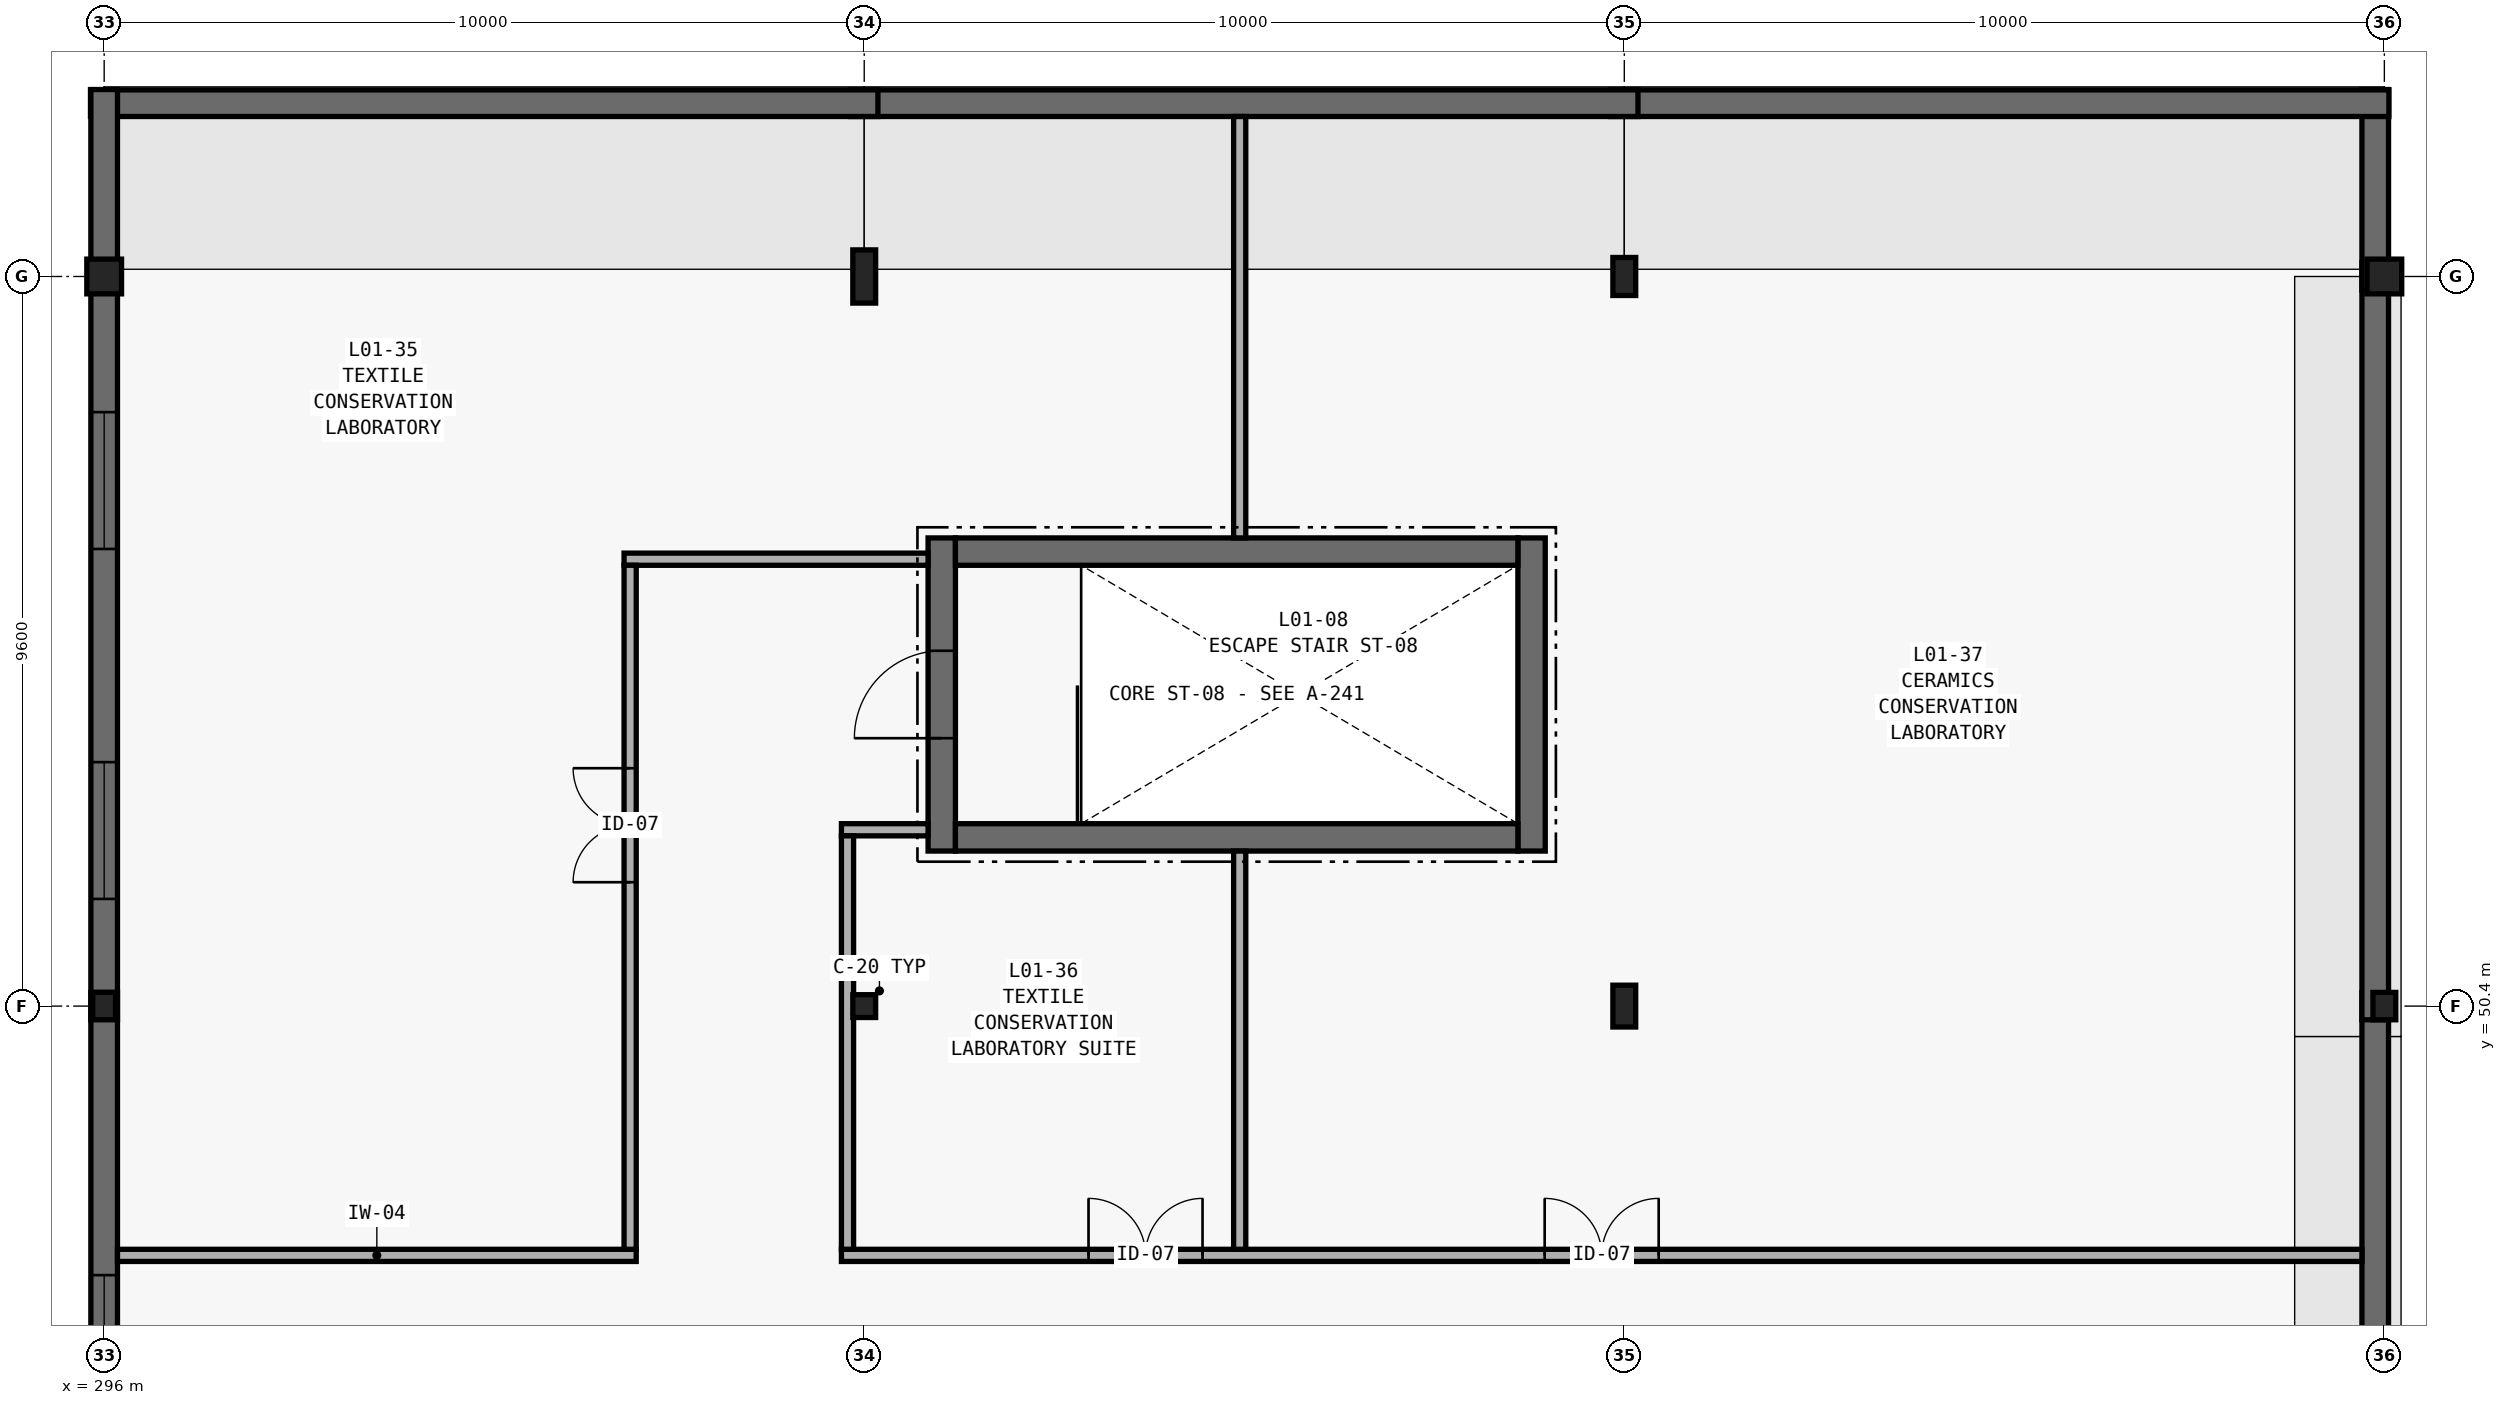
"""IFC4 building model, lengths in metres.
Left out: names, types, materials, properties, quantities, classifications, styles, units other than length and angle.
Written with IfcOpenShell. Run it as: python <this file> out.ifc"""

import sys

from ifc_helpers import new_model, si_unit, direction, frame, frame_2d, origin, origin_2d, place, context, subcontext, project, spatial, rectangle, hollow_rectangle, hollow_circle, i_section, extrude, element, fill, save


model = new_model("IFC4")
c1 = context("Model", 3, precision=1e-05, world=origin(), true_north=direction((0.0, 1.0)))
c2 = subcontext(c1, "Body", "Model", "MODEL_VIEW")
j1 = project(units=[si_unit("LENGTHUNIT", "METRE"), si_unit("PLANEANGLEUNIT", "RADIAN")], contexts=[c1])
p1 = place(None, origin())
s1 = spatial("IfcSite", under=j1, at=p1, CompositionType="ELEMENT")
p2 = place(p1, origin())
s2 = spatial("IfcBuilding", under=s1, at=p2, CompositionType="ELEMENT")
p3 = place(p2, frame((0.0, 0.0, 4.8)))
s3 = spatial("IfcBuildingStorey", under=s2, at=p3, CompositionType="ELEMENT", Elevation=4.8)
p4 = place(p3, frame((296.0, 50.4, 0.0), z_axis=(0.0, 0.0, 1.0), x_axis=(1.0, 0.0, 0.0)))
e1 = element("IfcColumn", 1, at=p4, inside=s3, PredefinedType="COLUMN", context=c2, shape_type="SweptSolid", body=[
    extrude(i_section(OverallWidth=0.3, OverallDepth=0.36, WebThickness=0.012, FlangeThickness=0.022, FilletRadius=0.027, at=origin_2d()), origin(), (0.0, 0.0, 1.0), 4.2),
])
p5 = place(p3, frame((296.0, 60.0, 0.0), z_axis=(0.0, 0.0, 1.0), x_axis=(1.0, 0.0, 0.0)))
e2 = element("IfcColumn", 2, at=p5, inside=s3, PredefinedType="COLUMN", context=c2, shape_type="SweptSolid", body=[
    extrude(hollow_circle(Radius=0.229, WallThickness=0.02, at=origin_2d()), origin(), (0.0, 0.0, 1.0), 4.2),
])
p6 = place(p3, frame((306.0, 50.4, 0.0), z_axis=(0.0, 0.0, 1.0), x_axis=(1.0, 0.0, 0.0)))
e3 = element("IfcColumn", 3, at=p6, inside=s3, PredefinedType="COLUMN", context=c2, shape_type="SweptSolid", body=[
    extrude(hollow_rectangle(XDim=0.3, YDim=0.3, WallThickness=0.016, at=origin_2d()), origin(), (0.0, 0.0, 1.0), 4.2),
])
p7 = place(p3, frame((306.0, 60.0, 0.0), z_axis=(0.0, 0.0, 1.0), x_axis=(1.0, 0.0, 0.0)))
e4 = element("IfcColumn", 4, at=p7, inside=s3, PredefinedType="COLUMN", context=c2, shape_type="SweptSolid", body=[
    extrude(i_section(OverallWidth=0.3, OverallDepth=0.7, WebThickness=0.017, FlangeThickness=0.032, FilletRadius=0.027, at=origin_2d()), origin(), (0.0, 0.0, 1.0), 4.2),
])
p8 = place(p3, frame((316.0, 50.4, 0.0), z_axis=(0.0, 0.0, 1.0), x_axis=(1.0, 0.0, 0.0)))
e5 = element("IfcColumn", 5, at=p8, inside=s3, PredefinedType="COLUMN", context=c2, shape_type="SweptSolid", body=[
    extrude(i_section(OverallWidth=0.3, OverallDepth=0.55, WebThickness=0.015, FlangeThickness=0.029, FilletRadius=0.027, at=origin_2d()), origin(), (0.0, 0.0, 1.0), 4.2),
])
p9 = place(p3, frame((316.0, 60.0, 0.0), z_axis=(0.0, 0.0, 1.0), x_axis=(1.0, 0.0, 0.0)))
e6 = element("IfcColumn", 6, at=p9, inside=s3, PredefinedType="COLUMN", context=c2, shape_type="SweptSolid", body=[
    extrude(i_section(OverallWidth=0.3, OverallDepth=0.5, WebThickness=0.014, FlangeThickness=0.028, FilletRadius=0.027, at=origin_2d()), origin(), (0.0, 0.0, 1.0), 4.2),
])
p10 = place(p3, frame((326.0, 50.4, 0.0), z_axis=(0.0, 0.0, 1.0), x_axis=(1.0, 0.0, 0.0)))
e7 = element("IfcColumn", 7, at=p10, inside=s3, PredefinedType="COLUMN", context=c2, shape_type="SweptSolid", body=[
    extrude(i_section(OverallWidth=0.3, OverallDepth=0.36, WebThickness=0.012, FlangeThickness=0.022, FilletRadius=0.027, at=origin_2d()), origin(), (0.0, 0.0, 1.0), 4.2),
])
p11 = place(p3, frame((326.0, 60.0, 0.0), z_axis=(0.0, 0.0, 1.0), x_axis=(1.0, 0.0, 0.0)))
e8 = element("IfcColumn", 8, at=p11, inside=s3, PredefinedType="COLUMN", context=c2, shape_type="SweptSolid", body=[
    extrude(hollow_circle(Radius=0.229, WallThickness=0.02, at=origin_2d()), origin(), (0.0, 0.0, 1.0), 4.2),
])
p12 = place(p3, frame((325.88, 38.22, 0.0), z_axis=(0.0, 0.0, 1.0), x_axis=(0.0, 1.0, 0.0)))
e9 = element("IfcWall", 9, at=p12, inside=s3, PredefinedType="STANDARD", context=c2, shape_type="SweptSolid", body=[
    extrude(rectangle(XDim=12.36, YDim=0.35, at=frame_2d((6.18, 0.0))), origin(), (0.0, 0.0, 1.0), 3.9),
])
p13 = place(p3, frame((325.88, 50.22, 0.0), z_axis=(0.0, 0.0, 1.0), x_axis=(0.0, 1.0, 0.0)))
e10 = element("IfcWall", 10, at=p13, inside=s3, PredefinedType="STANDARD", context=c2, shape_type="SweptSolid", body=[
    extrude(rectangle(XDim=9.96, YDim=0.35, at=frame_2d((4.98, 0.0))), origin(), (0.0, 0.0, 1.0), 3.9),
])
p14 = place(p3, frame((325.88, 59.82, 0.0), z_axis=(0.0, 0.0, 1.0), x_axis=(0.0, 1.0, 0.0)))
e11 = element("IfcWall", 11, at=p14, inside=s3, PredefinedType="STANDARD", context=c2, shape_type="SweptSolid", body=[
    extrude(rectangle(XDim=2.64, YDim=0.35, at=frame_2d((1.32, 0.0))), origin(), (0.0, 0.0, 1.0), 3.9),
])
p15 = place(p3, frame((326.06, 62.28, 0.0), z_axis=(0.0, 0.0, 1.0), x_axis=(-1.0, 0.0, 0.0)))
e12 = element("IfcWall", 12, at=p15, inside=s3, PredefinedType="STANDARD", context=c2, shape_type="SweptSolid", body=[
    extrude(rectangle(XDim=10.24, YDim=0.35, at=frame_2d((5.12, 0.0))), origin(), (0.0, 0.0, 1.0), 3.9),
])
for number, where, z_axis, x_axis in (
    (13, (316.18, 62.28, 0.0), (0.0, 0.0, 1.0), (-1.0, 0.0, 0.0)),
    (14, (306.18, 62.28, 0.0), (0.0, 0.0, 1.0), (-1.0, 0.0, 0.0)),
):
    element("IfcWall", number, at=place(p3, frame(where, z_axis=z_axis, x_axis=x_axis)), inside=s3, PredefinedType="STANDARD", context=c2, shape_type="SweptSolid", body=[
        extrude(rectangle(XDim=10.36, YDim=0.35, at=frame_2d((5.18, 0.0))), origin(), (0.0, 0.0, 1.0), 3.9),
    ])
p16 = place(p3, frame((296.0, 62.46, 0.0), z_axis=(0.0, 0.0, 1.0), x_axis=(0.0, -1.0, 0.0)))
e15 = element("IfcWall", 15, at=p16, inside=s3, PredefinedType="STANDARD", context=c2, shape_type="SweptSolid", body=[
    extrude(rectangle(XDim=2.64, YDim=0.35, at=frame_2d((1.32, 0.0))), origin(), (0.0, 0.0, 1.0), 3.9),
])
p17 = place(p3, frame((296.0, 60.18, 0.0), z_axis=(0.0, 0.0, 1.0), x_axis=(0.0, -1.0, 0.0)))
e16 = element("IfcWall", 16, at=p17, inside=s3, PredefinedType="STANDARD", context=c2, shape_type="SweptSolid", body=[
    extrude(rectangle(XDim=9.96, YDim=0.35, at=frame_2d((4.98, 0.0))), origin(), (0.0, 0.0, 1.0), 3.9),
])
p18 = place(p17, frame((1.965, 0.0, 0.9)))
e17 = element("IfcOpeningElement", 17, at=p18, cuts=e16, PredefinedType="OPENING", context=c2, shape_type="SweptSolid", body=[
    extrude(rectangle(XDim=1.8, YDim=1.1, at=frame_2d((0.9, 0.55))), frame((0.0, 0.19, 0.0), z_axis=(0.0, -1.0, 0.0), x_axis=(1.0, 0.0, 0.0)), (0.0, 0.0, 1.0), 0.38),
])
p19 = place(p17, frame((6.57, 0.0, 0.9)))
e18 = element("IfcOpeningElement", 18, at=p19, cuts=e16, PredefinedType="OPENING", context=c2, shape_type="SweptSolid", body=[
    extrude(rectangle(XDim=1.8, YDim=1.1, at=frame_2d((0.9, 0.55))), frame((0.0, 0.19, 0.0), z_axis=(0.0, -1.0, 0.0), x_axis=(1.0, 0.0, 0.0)), (0.0, 0.0, 1.0), 0.38),
])
p20 = place(p3, frame((296.0, 50.58, 0.0), z_axis=(0.0, 0.0, 1.0), x_axis=(0.0, -1.0, 0.0)))
e19 = element("IfcWall", 19, at=p20, inside=s3, PredefinedType="STANDARD", context=c2, shape_type="SweptSolid", body=[
    extrude(rectangle(XDim=12.48, YDim=0.35, at=frame_2d((6.24, 0.0))), origin(), (0.0, 0.0, 1.0), 3.9),
])
p21 = place(p20, frame((3.72, 0.0, 1.8)))
e20 = element("IfcOpeningElement", 20, at=p21, cuts=e19, PredefinedType="OPENING", context=c2, shape_type="SweptSolid", body=[
    extrude(rectangle(XDim=1.8, YDim=1.1, at=frame_2d((0.9, 0.55))), frame((0.0, 0.19, 0.0), z_axis=(0.0, -1.0, 0.0), x_axis=(1.0, 0.0, 0.0)), (0.0, 0.0, 1.0), 0.38),
])
p22 = place(p20, frame((8.46, 0.0, 1.8)))
e21 = element("IfcOpeningElement", 21, at=p22, cuts=e19, PredefinedType="OPENING", context=c2, shape_type="SweptSolid", body=[
    extrude(rectangle(XDim=1.8, YDim=1.1, at=frame_2d((0.9, 0.55))), frame((0.0, 0.19, 0.0), z_axis=(0.0, -1.0, 0.0), x_axis=(1.0, 0.0, 0.0)), (0.0, 0.0, 1.0), 0.38),
])
p23 = place(p3, frame((307.02, 52.44, 0.0), z_axis=(0.0, 0.0, 1.0), x_axis=(0.0, 1.0, 0.0)))
e22 = element("IfcWall", 22, at=p23, inside=s3, PredefinedType="SHEAR", context=c2, shape_type="SweptSolid", body=[
    extrude(rectangle(XDim=4.12, YDim=0.36, at=frame_2d((2.06, 0.0))), origin(), (0.0, 0.0, 1.0), 3.88),
])
p24 = place(p23, frame((1.485, 0.0, 0.0)))
e23 = element("IfcOpeningElement", 23, at=p24, cuts=e22, PredefinedType="OPENING", context=c2, shape_type="SweptSolid", body=[
    extrude(rectangle(XDim=1.15, YDim=2.15, at=frame_2d((0.575, 1.075))), frame((0.0, 0.195, 0.0), z_axis=(0.0, -1.0, 0.0), x_axis=(1.0, 0.0, 0.0)), (0.0, 0.0, 1.0), 0.39),
])
p25 = place(p3, frame((314.78, 52.44, 0.0), z_axis=(0.0, 0.0, 1.0), x_axis=(0.0, 1.0, 0.0)))
e24 = element("IfcWall", 24, at=p25, inside=s3, PredefinedType="SHEAR", context=c2, shape_type="SweptSolid", body=[
    extrude(rectangle(XDim=4.12, YDim=0.36, at=frame_2d((2.06, 0.0))), origin(), (0.0, 0.0, 1.0), 3.88),
])
for number, where, z_axis, x_axis in (
    (25, (307.2, 56.38, 0.0), (0.0, 0.0, 1.0), (1.0, 0.0, 0.0)),
    (26, (307.2, 52.62, 0.0), (0.0, 0.0, 1.0), (1.0, 0.0, 0.0)),
):
    element("IfcWall", number, at=place(p3, frame(where, z_axis=z_axis, x_axis=x_axis)), inside=s3, PredefinedType="SHEAR", context=c2, shape_type="SweptSolid", body=[
        extrude(rectangle(XDim=7.4, YDim=0.36, at=frame_2d((3.7, 0.0))), origin(), (0.0, 0.0, 1.0), 3.88),
    ])
p26 = place(p3, frame((296.175, 47.12, 0.0), z_axis=(0.0, 0.0, 1.0), x_axis=(1.0, 0.0, 0.0)))
e27 = element("IfcWall", 27, at=p26, inside=s3, PredefinedType="PARTITIONING", context=c2, shape_type="SweptSolid", body=[
    extrude(rectangle(XDim=6.825, YDim=0.16, at=frame_2d((3.413, 0.0))), origin(), (0.0, 0.0, 1.0), 2.76),
])
p27 = place(p3, frame((305.7, 47.12, 0.0), z_axis=(0.0, 0.0, 1.0), x_axis=(1.0, 0.0, 0.0)))
e28 = element("IfcWall", 28, at=p27, inside=s3, PredefinedType="PARTITIONING", context=c2, shape_type="SweptSolid", body=[
    extrude(rectangle(XDim=20.005, YDim=0.16, at=frame_2d((10.002, 0.0))), origin(), (0.0, 0.0, 1.0), 2.76),
])
p28 = place(p27, frame((3.251, 0.0, 0.0)))
e29 = element("IfcOpeningElement", 29, at=p28, cuts=e28, PredefinedType="OPENING", context=c2, shape_type="SweptSolid", body=[
    extrude(rectangle(XDim=1.5, YDim=2.2, at=frame_2d((0.75, 1.1))), frame((0.0, 0.095, 0.0), z_axis=(0.0, -1.0, 0.0), x_axis=(1.0, 0.0, 0.0)), (0.0, 0.0, 1.0), 0.19),
])
p29 = place(p27, frame((9.252, 0.0, 0.0)))
e30 = element("IfcOpeningElement", 30, at=p29, cuts=e28, PredefinedType="OPENING", context=c2, shape_type="SweptSolid", body=[
    extrude(rectangle(XDim=1.5, YDim=2.2, at=frame_2d((0.75, 1.1))), frame((0.0, 0.095, 0.0), z_axis=(0.0, -1.0, 0.0), x_axis=(1.0, 0.0, 0.0)), (0.0, 0.0, 1.0), 0.19),
])
p30 = place(p3, frame((305.7, 52.72, 0.0), z_axis=(0.0, 0.0, 1.0), x_axis=(1.0, 0.0, 0.0)))
e31 = element("IfcWall", 31, at=p30, inside=s3, PredefinedType="PARTITIONING", context=c2, shape_type="SweptSolid", body=[
    extrude(rectangle(XDim=1.14, YDim=0.16, at=frame_2d((0.57, 0.0))), origin(), (0.0, 0.0, 1.0), 2.76),
])
p31 = place(p3, frame((302.84, 56.28, 0.0), z_axis=(0.0, 0.0, 1.0), x_axis=(1.0, 0.0, 0.0)))
e32 = element("IfcWall", 32, at=p31, inside=s3, PredefinedType="PARTITIONING", context=c2, shape_type="SweptSolid", body=[
    extrude(rectangle(XDim=4.0, YDim=0.16, at=frame_2d((2.0, 0.0))), origin(), (0.0, 0.0, 1.0), 2.76),
])
p32 = place(p3, frame((302.92, 47.2, 0.0), z_axis=(0.0, 0.0, 1.0), x_axis=(0.0, 1.0, 0.0)))
e33 = element("IfcWall", 33, at=p32, inside=s3, PredefinedType="PARTITIONING", context=c2, shape_type="SweptSolid", body=[
    extrude(rectangle(XDim=9.0, YDim=0.16, at=frame_2d((4.5, 0.0))), origin(), (0.0, 0.0, 1.0), 2.76),
])
p33 = place(p32, frame((4.83, 0.0, 0.0)))
e34 = element("IfcOpeningElement", 34, at=p33, cuts=e33, PredefinedType="OPENING", context=c2, shape_type="SweptSolid", body=[
    extrude(rectangle(XDim=1.5, YDim=2.2, at=frame_2d((0.75, 1.1))), frame((0.0, 0.095, 0.0), z_axis=(0.0, -1.0, 0.0), x_axis=(1.0, 0.0, 0.0)), (0.0, 0.0, 1.0), 0.19),
])
p34 = place(p3, frame((305.78, 47.2, 0.0), z_axis=(0.0, 0.0, 1.0), x_axis=(0.0, 1.0, 0.0)))
e35 = element("IfcWall", 35, at=p34, inside=s3, PredefinedType="PARTITIONING", context=c2, shape_type="SweptSolid", body=[
    extrude(rectangle(XDim=5.44, YDim=0.16, at=frame_2d((2.72, 0.0))), origin(), (0.0, 0.0, 1.0), 2.76),
])
p35 = place(p3, frame((310.94, 47.2, 0.0), z_axis=(0.0, 0.0, 1.0), x_axis=(0.0, 1.0, 0.0)))
e36 = element("IfcWall", 36, at=p35, inside=s3, PredefinedType="PARTITIONING", context=c2, shape_type="SweptSolid", body=[
    extrude(rectangle(XDim=5.24, YDim=0.16, at=frame_2d((2.62, 0.0))), origin(), (0.0, 0.0, 1.0), 2.76),
])
p36 = place(p3, frame((310.94, 56.56, 0.0), z_axis=(0.0, 0.0, 1.0), x_axis=(0.0, 1.0, 0.0)))
e37 = element("IfcWall", 37, at=p36, inside=s3, PredefinedType="PARTITIONING", context=c2, shape_type="SweptSolid", body=[
    extrude(rectangle(XDim=5.545, YDim=0.16, at=frame_2d((2.772, 0.0))), origin(), (0.0, 0.0, 1.0), 2.76),
])
p37 = place(p18, origin())
e38 = element("IfcWindow", 38, at=p37, inside=s3, PartitioningType="SINGLE_PANEL", PredefinedType="WINDOW", context=c2, shape_type="SweptSolid", body=[
    extrude(rectangle(XDim=1.8, YDim=1.1, at=frame_2d((0.9, 0.55))), frame((0.0, 0.03, 0.0), z_axis=(0.0, -1.0, 0.0), x_axis=(1.0, 0.0, 0.0)), (0.0, 0.0, 1.0), 0.06),
])
fill(e17, e38)
p38 = place(p19, origin())
e39 = element("IfcWindow", 39, at=p38, inside=s3, PartitioningType="SINGLE_PANEL", PredefinedType="WINDOW", context=c2, shape_type="SweptSolid", body=[
    extrude(rectangle(XDim=1.8, YDim=1.1, at=frame_2d((0.9, 0.55))), frame((0.0, 0.03, 0.0), z_axis=(0.0, -1.0, 0.0), x_axis=(1.0, 0.0, 0.0)), (0.0, 0.0, 1.0), 0.06),
])
fill(e18, e39)
p39 = place(p21, origin())
e40 = element("IfcWindow", 40, at=p39, inside=s3, PartitioningType="SINGLE_PANEL", PredefinedType="WINDOW", context=c2, shape_type="SweptSolid", body=[
    extrude(rectangle(XDim=1.8, YDim=1.1, at=frame_2d((0.9, 0.55))), frame((0.0, 0.03, 0.0), z_axis=(0.0, -1.0, 0.0), x_axis=(1.0, 0.0, 0.0)), (0.0, 0.0, 1.0), 0.06),
])
fill(e20, e40)
p40 = place(p24, origin())
e41 = element("IfcDoor", 41, at=p40, inside=s3, OperationType="SINGLE_SWING_LEFT", PredefinedType="DOOR", context=c2, shape_type="SweptSolid", body=[
    extrude(rectangle(XDim=1.15, YDim=2.15, at=frame_2d((0.575, 1.075))), frame((0.0, 0.025, 0.0), z_axis=(0.0, -1.0, 0.0), x_axis=(1.0, 0.0, 0.0)), (0.0, 0.0, 1.0), 0.05),
])
fill(e23, e41)
p41 = place(p33, origin())
e42 = element("IfcDoor", 42, at=p41, inside=s3, OperationType="DOUBLE_DOOR_SINGLE_SWING", PredefinedType="DOOR", context=c2, shape_type="SweptSolid", body=[
    extrude(rectangle(XDim=1.5, YDim=2.2, at=frame_2d((0.75, 1.1))), frame((0.0, 0.025, 0.0), z_axis=(0.0, -1.0, 0.0), x_axis=(1.0, 0.0, 0.0)), (0.0, 0.0, 1.0), 0.05),
])
fill(e34, e42)
p42 = place(p28, origin())
e43 = element("IfcDoor", 43, at=p42, inside=s3, OperationType="DOUBLE_DOOR_SINGLE_SWING", PredefinedType="DOOR", context=c2, shape_type="SweptSolid", body=[
    extrude(rectangle(XDim=1.5, YDim=2.2, at=frame_2d((0.75, 1.1))), frame((0.0, 0.025, 0.0), z_axis=(0.0, -1.0, 0.0), x_axis=(1.0, 0.0, 0.0)), (0.0, 0.0, 1.0), 0.05),
])
fill(e29, e43)
p43 = place(p29, origin())
e44 = element("IfcDoor", 44, at=p43, inside=s3, OperationType="DOUBLE_DOOR_SINGLE_SWING", PredefinedType="DOOR", context=c2, shape_type="SweptSolid", body=[
    extrude(rectangle(XDim=1.5, YDim=2.2, at=frame_2d((0.75, 1.1))), frame((0.0, 0.025, 0.0), z_axis=(0.0, -1.0, 0.0), x_axis=(1.0, 0.0, 0.0)), (0.0, 0.0, 1.0), 0.05),
])
fill(e30, e44)
save(model, sys.argv[1])
